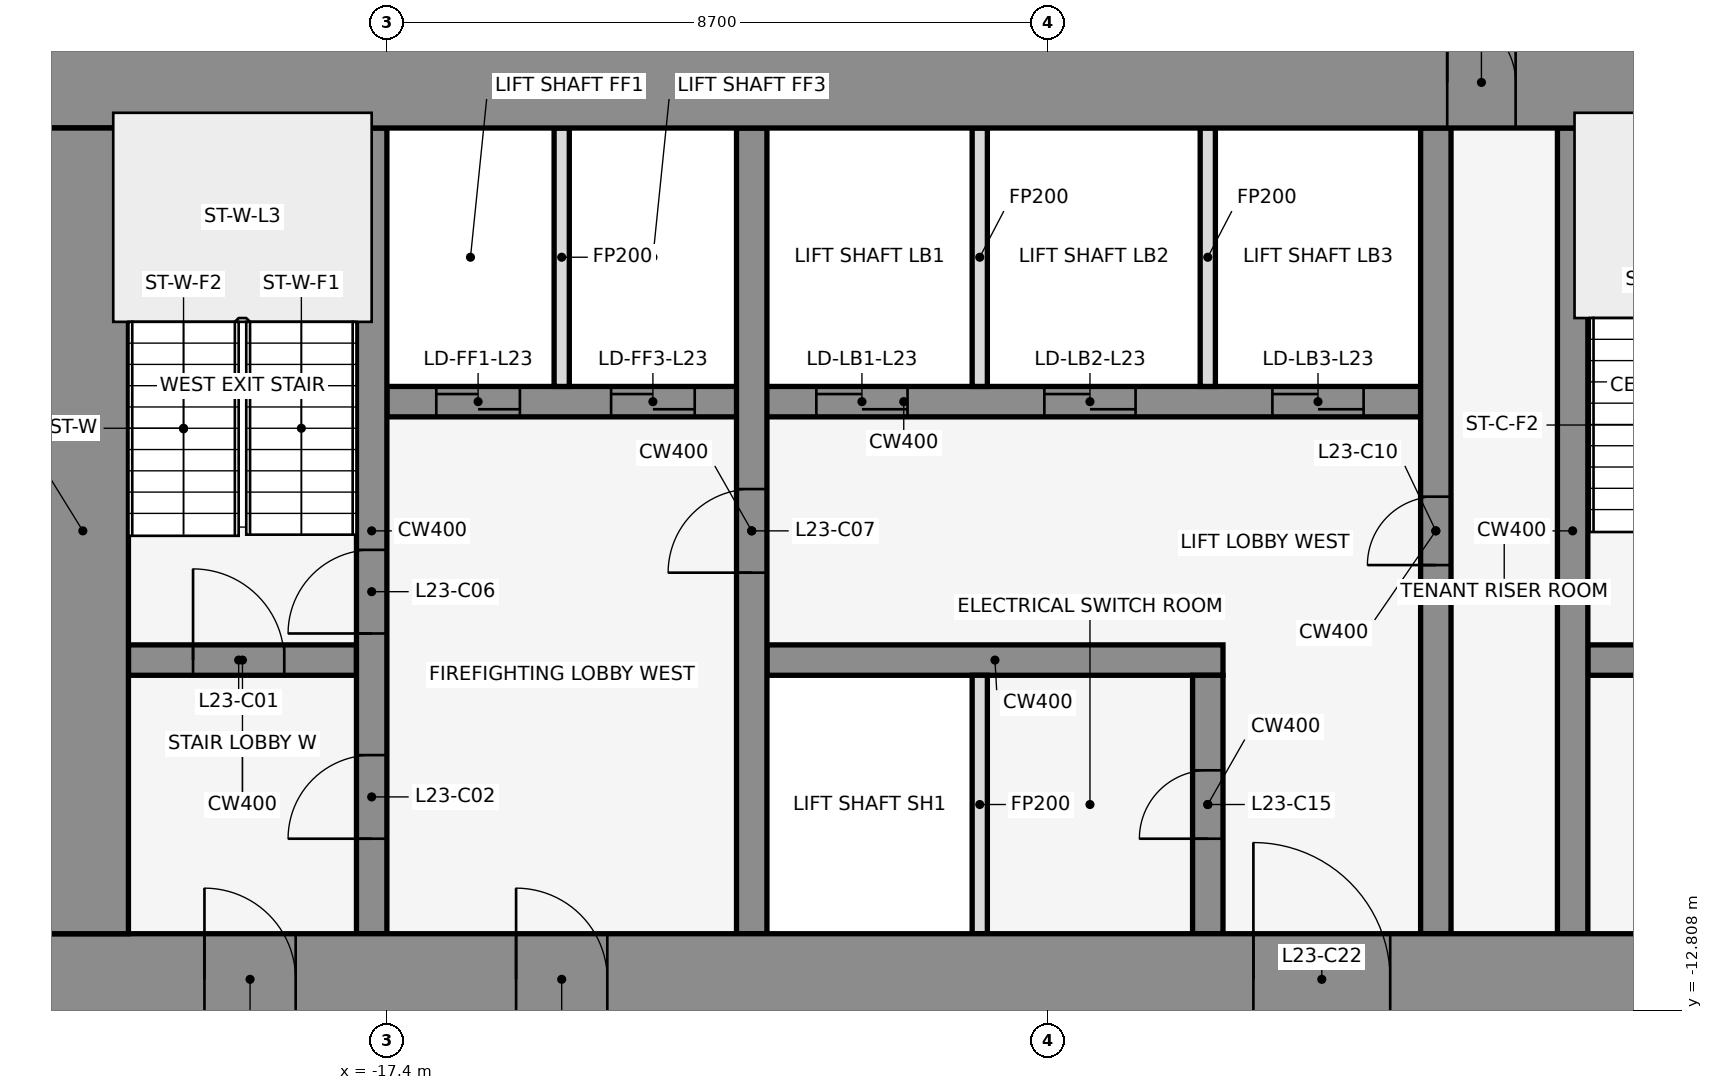
"""IFC4 building model, lengths in metres.
Left out: names, types, materials, properties, quantities, classifications, styles, units other than length and angle.
Written with IfcOpenShell. Run it as: python <this file> out.ifc"""

import sys

from ifc_helpers import new_model, si_unit, direction, frame, frame_2d, origin, place, context, subcontext, project, spatial, rectangle, extrude, element, fill, save


model = new_model("IFC4")
c1 = context("Model", 3, precision=1e-05, world=origin(), true_north=direction((0.0, 1.0)))
c2 = subcontext(c1, "Body", "Model", "MODEL_VIEW")
j1 = project(units=[si_unit("LENGTHUNIT", "METRE"), si_unit("PLANEANGLEUNIT", "RADIAN")], contexts=[c1])
p1 = place(None, origin())
s1 = spatial("IfcSite", under=j1, at=p1, CompositionType="ELEMENT")
p2 = place(p1, origin())
s2 = spatial("IfcBuilding", under=s1, at=p2, CompositionType="ELEMENT")
p3 = place(p2, frame((0.0, 0.0, 110.4)))
s3 = spatial("IfcBuildingStorey", under=s2, at=p3, CompositionType="ELEMENT", Elevation=110.4)
for number, where, z_axis, x_axis in (
    (1, (-0.068, -0.105, 0.0), (0.0, 0.0, 1.0), (-0.84, 0.543, 0.0)),
    (2, (-14.599, 1.08, 0.0), (0.0, 0.0, 1.0), (-0.84, -0.543, 0.0)),
):
    element("IfcWall", number, at=place(p3, frame(where, z_axis=z_axis, x_axis=x_axis)), inside=s3, PredefinedType="STANDARD", context=c2, shape_type="SweptSolid", body=[
        extrude(rectangle(XDim=2.183, YDim=0.25, at=frame_2d((1.091, 0.0))), origin(), (0.0, 0.0, 1.0), 3.95),
    ])
p4 = place(p3, frame((-20.8, -8.2, 0.0), z_axis=(0.0, 0.0, 1.0), x_axis=(1.0, 0.0, 0.0)))
e3 = element("IfcWall", 3, at=p4, inside=s3, PredefinedType="SHEAR", context=c2, shape_type="SweptSolid", body=[
    extrude(rectangle(XDim=3.0, YDim=0.4, at=frame_2d((1.5, 0.0))), origin(), (0.0, 0.0, 1.0), 4.1),
])
p5 = place(p4, frame((0.85, 0.0, 0.0)))
e4 = element("IfcOpeningElement", 4, at=p5, cuts=e3, PredefinedType="OPENING", context=c2, shape_type="SweptSolid", body=[
    extrude(rectangle(XDim=1.2, YDim=2.1, at=frame_2d((0.6, 1.05))), frame((0.0, 0.212, 0.0), z_axis=(0.0, -1.0, 0.0), x_axis=(1.0, 0.0, 0.0)), (0.0, 0.0, 1.0), 0.424),
])
p6 = place(p3, frame((-12.4, -8.2, 0.0), z_axis=(0.0, 0.0, 1.0), x_axis=(1.0, 0.0, 0.0)))
e5 = element("IfcWall", 5, at=p6, inside=s3, PredefinedType="SHEAR", context=c2, shape_type="SweptSolid", body=[
    extrude(rectangle(XDim=6.0, YDim=0.4, at=frame_2d((3.0, 0.0))), origin(), (0.0, 0.0, 1.0), 4.1),
])
p7 = place(p3, frame((-1.6, -8.2, 0.0), z_axis=(0.0, 0.0, 1.0), x_axis=(1.0, 0.0, 0.0)))
e6 = element("IfcWall", 6, at=p7, inside=s3, PredefinedType="SHEAR", context=c2, shape_type="SweptSolid", body=[
    extrude(rectangle(XDim=3.2, YDim=0.4, at=frame_2d((1.6, 0.0))), origin(), (0.0, 0.0, 1.0), 4.1),
])
p8 = place(p7, frame((1.05, 0.0, 0.0)))
e7 = element("IfcOpeningElement", 7, at=p8, cuts=e6, PredefinedType="OPENING", context=c2, shape_type="SweptSolid", body=[
    extrude(rectangle(XDim=1.2, YDim=2.1, at=frame_2d((0.6, 1.05))), frame((0.0, 0.212, 0.0), z_axis=(0.0, -1.0, 0.0), x_axis=(1.0, 0.0, 0.0)), (0.0, 0.0, 1.0), 0.424),
])
p9 = place(p3, frame((-17.4, -4.8, 0.0), z_axis=(0.0, 0.0, 1.0), x_axis=(1.0, 0.0, 0.0)))
e8 = element("IfcWall", 8, at=p9, inside=s3, PredefinedType="SHEAR", context=c2, shape_type="SweptSolid", body=[
    extrude(rectangle(XDim=13.6, YDim=0.4, at=frame_2d((6.8, 0.0))), origin(), (0.0, 0.0, 1.0), 4.1),
])
p10 = place(p9, frame((0.65, 0.0, 0.0)))
e9 = element("IfcOpeningElement", 9, at=p10, cuts=e8, PredefinedType="OPENING", context=c2, shape_type="SweptSolid", body=[
    extrude(rectangle(XDim=1.1, YDim=2.1, at=frame_2d((0.55, 1.05))), frame((0.0, 0.212, 0.0), z_axis=(0.0, -1.0, 0.0), x_axis=(1.0, 0.0, 0.0)), (0.0, 0.0, 1.0), 0.424),
])
p11 = place(p9, frame((2.95, 0.0, 0.0)))
e10 = element("IfcOpeningElement", 10, at=p11, cuts=e8, PredefinedType="OPENING", context=c2, shape_type="SweptSolid", body=[
    extrude(rectangle(XDim=1.1, YDim=2.1, at=frame_2d((0.55, 1.05))), frame((0.0, 0.212, 0.0), z_axis=(0.0, -1.0, 0.0), x_axis=(1.0, 0.0, 0.0)), (0.0, 0.0, 1.0), 0.424),
])
p12 = place(p9, frame((5.65, 0.0, 0.0)))
e11 = element("IfcOpeningElement", 11, at=p12, cuts=e8, PredefinedType="OPENING", context=c2, shape_type="SweptSolid", body=[
    extrude(rectangle(XDim=1.2, YDim=2.1, at=frame_2d((0.6, 1.05))), frame((0.0, 0.212, 0.0), z_axis=(0.0, -1.0, 0.0), x_axis=(1.0, 0.0, 0.0)), (0.0, 0.0, 1.0), 0.424),
])
p13 = place(p9, frame((8.65, 0.0, 0.0)))
e12 = element("IfcOpeningElement", 12, at=p13, cuts=e8, PredefinedType="OPENING", context=c2, shape_type="SweptSolid", body=[
    extrude(rectangle(XDim=1.2, YDim=2.1, at=frame_2d((0.6, 1.05))), frame((0.0, 0.212, 0.0), z_axis=(0.0, -1.0, 0.0), x_axis=(1.0, 0.0, 0.0)), (0.0, 0.0, 1.0), 0.424),
])
p14 = place(p9, frame((11.65, 0.0, 0.0)))
e13 = element("IfcOpeningElement", 13, at=p14, cuts=e8, PredefinedType="OPENING", context=c2, shape_type="SweptSolid", body=[
    extrude(rectangle(XDim=1.2, YDim=2.1, at=frame_2d((0.6, 1.05))), frame((0.0, 0.212, 0.0), z_axis=(0.0, -1.0, 0.0), x_axis=(1.0, 0.0, 0.0)), (0.0, 0.0, 1.0), 0.424),
])
p15 = place(p3, frame((-17.6, -11.8, 0.0), z_axis=(0.0, 0.0, 1.0), x_axis=(0.0, 1.0, 0.0)))
e14 = element("IfcWall", 14, at=p15, inside=s3, PredefinedType="SHEAR", context=c2, shape_type="SweptSolid", body=[
    extrude(rectangle(XDim=10.6, YDim=0.4, at=frame_2d((5.3, 0.0))), origin(), (0.0, 0.0, 1.0), 4.1),
])
p16 = place(p15, frame((1.25, 0.0, 0.0)))
e15 = element("IfcOpeningElement", 15, at=p16, cuts=e14, PredefinedType="OPENING", context=c2, shape_type="SweptSolid", body=[
    extrude(rectangle(XDim=1.1, YDim=2.1, at=frame_2d((0.55, 1.05))), frame((0.0, 0.212, 0.0), z_axis=(0.0, -1.0, 0.0), x_axis=(1.0, 0.0, 0.0)), (0.0, 0.0, 1.0), 0.424),
])
p17 = place(p15, frame((3.95, 0.0, 0.0)))
e16 = element("IfcOpeningElement", 16, at=p17, cuts=e14, PredefinedType="OPENING", context=c2, shape_type="SweptSolid", body=[
    extrude(rectangle(XDim=1.1, YDim=2.1, at=frame_2d((0.55, 1.05))), frame((0.0, 0.212, 0.0), z_axis=(0.0, -1.0, 0.0), x_axis=(1.0, 0.0, 0.0)), (0.0, 0.0, 1.0), 0.424),
])
p18 = place(p3, frame((-15.1, -4.6, 0.0), z_axis=(0.0, 0.0, 1.0), x_axis=(0.0, 1.0, 0.0)))
e17 = element("IfcWall", 17, at=p18, inside=s3, PredefinedType="PARTITIONING", context=c2, shape_type="SweptSolid", body=[
    extrude(rectangle(XDim=3.4, YDim=0.2, at=frame_2d((1.7, 0.0))), origin(), (0.0, 0.0, 1.0), 3.018),
])
p19 = place(p3, frame((-12.6, -11.8, 0.0), z_axis=(0.0, 0.0, 1.0), x_axis=(0.0, 1.0, 0.0)))
e18 = element("IfcWall", 18, at=p19, inside=s3, PredefinedType="SHEAR", context=c2, shape_type="SweptSolid", body=[
    extrude(rectangle(XDim=10.6, YDim=0.4, at=frame_2d((5.3, 0.0))), origin(), (0.0, 0.0, 1.0), 4.1),
])
p20 = place(p19, frame((4.75, 0.0, 0.0)))
e19 = element("IfcOpeningElement", 19, at=p20, cuts=e18, PredefinedType="OPENING", context=c2, shape_type="SweptSolid", body=[
    extrude(rectangle(XDim=1.1, YDim=2.1, at=frame_2d((0.55, 1.05))), frame((0.0, 0.212, 0.0), z_axis=(0.0, -1.0, 0.0), x_axis=(1.0, 0.0, 0.0)), (0.0, 0.0, 1.0), 0.424),
])
for number, where, z_axis, x_axis in (
    (20, (-9.6, -11.8, 0.0), (0.0, 0.0, 1.0), (0.0, 1.0, 0.0)),
    (21, (-9.6, -4.6, 0.0), (0.0, 0.0, 1.0), (0.0, 1.0, 0.0)),
):
    element("IfcWall", number, at=place(p3, frame(where, z_axis=z_axis, x_axis=x_axis)), inside=s3, PredefinedType="PARTITIONING", context=c2, shape_type="SweptSolid", body=[
        extrude(rectangle(XDim=3.4, YDim=0.2, at=frame_2d((1.7, 0.0))), origin(), (0.0, 0.0, 1.0), 3.018),
    ])
p21 = place(p3, frame((-6.6, -11.8, 0.0), z_axis=(0.0, 0.0, 1.0), x_axis=(0.0, 1.0, 0.0)))
e22 = element("IfcWall", 22, at=p21, inside=s3, PredefinedType="SHEAR", context=c2, shape_type="SweptSolid", body=[
    extrude(rectangle(XDim=3.4, YDim=0.4, at=frame_2d((1.7, 0.0))), origin(), (0.0, 0.0, 1.0), 4.1),
])
p22 = place(p21, frame((1.25, 0.0, 0.0)))
e23 = element("IfcOpeningElement", 23, at=p22, cuts=e22, PredefinedType="OPENING", context=c2, shape_type="SweptSolid", body=[
    extrude(rectangle(XDim=0.9, YDim=2.1, at=frame_2d((0.45, 1.05))), frame((0.0, 0.212, 0.0), z_axis=(0.0, -1.0, 0.0), x_axis=(1.0, 0.0, 0.0)), (0.0, 0.0, 1.0), 0.424),
])
p23 = place(p3, frame((-6.6, -4.6, 0.0), z_axis=(0.0, 0.0, 1.0), x_axis=(0.0, 1.0, 0.0)))
e24 = element("IfcWall", 24, at=p23, inside=s3, PredefinedType="PARTITIONING", context=c2, shape_type="SweptSolid", body=[
    extrude(rectangle(XDim=3.4, YDim=0.2, at=frame_2d((1.7, 0.0))), origin(), (0.0, 0.0, 1.0), 3.018),
])
p24 = place(p3, frame((-3.6, -11.8, 0.0), z_axis=(0.0, 0.0, 1.0), x_axis=(0.0, 1.0, 0.0)))
e25 = element("IfcWall", 25, at=p24, inside=s3, PredefinedType="SHEAR", context=c2, shape_type="SweptSolid", body=[
    extrude(rectangle(XDim=10.6, YDim=0.4, at=frame_2d((5.3, 0.0))), origin(), (0.0, 0.0, 1.0), 4.1),
])
p25 = place(p24, frame((4.85, 0.0, 0.0)))
e26 = element("IfcOpeningElement", 26, at=p25, cuts=e25, PredefinedType="OPENING", context=c2, shape_type="SweptSolid", body=[
    extrude(rectangle(XDim=0.9, YDim=2.1, at=frame_2d((0.45, 1.05))), frame((0.0, 0.212, 0.0), z_axis=(0.0, -1.0, 0.0), x_axis=(1.0, 0.0, 0.0)), (0.0, 0.0, 1.0), 0.424),
])
p26 = place(p3, frame((-1.8, -11.8, 0.0), z_axis=(0.0, 0.0, 1.0), x_axis=(0.0, 1.0, 0.0)))
e27 = element("IfcWall", 27, at=p26, inside=s3, PredefinedType="SHEAR", context=c2, shape_type="SweptSolid", body=[
    extrude(rectangle(XDim=10.6, YDim=0.4, at=frame_2d((5.3, 0.0))), origin(), (0.0, 0.0, 1.0), 4.1),
])
p27 = place(p3, frame((-22.0, -0.6, 0.0), z_axis=(0.0, 0.0, 1.0), x_axis=(1.0, 0.0, 0.0)))
e28 = element("IfcWall", 28, at=p27, inside=s3, PredefinedType="SHEAR", context=c2, shape_type="SweptSolid", body=[
    extrude(rectangle(XDim=44.0, YDim=1.2, at=frame_2d((22.0, 0.0))), origin(), (0.0, 0.0, 1.0), 4.1),
])
p28 = place(p27, frame((18.55, 0.0, 0.0)))
e29 = element("IfcOpeningElement", 29, at=p28, cuts=e28, PredefinedType="OPENING", context=c2, shape_type="SweptSolid", body=[
    extrude(rectangle(XDim=0.9, YDim=2.1, at=frame_2d((0.45, 1.05))), frame((0.0, 0.612, 0.0), z_axis=(0.0, -1.0, 0.0), x_axis=(1.0, 0.0, 0.0)), (0.0, 0.0, 1.0), 1.224),
])
p29 = place(p27, frame((24.55, 0.0, 0.0)))
e30 = element("IfcOpeningElement", 30, at=p29, cuts=e28, PredefinedType="OPENING", context=c2, shape_type="SweptSolid", body=[
    extrude(rectangle(XDim=0.9, YDim=2.1, at=frame_2d((0.45, 1.05))), frame((0.0, 0.612, 0.0), z_axis=(0.0, -1.0, 0.0), x_axis=(1.0, 0.0, 0.0)), (0.0, 0.0, 1.0), 1.224),
])
p30 = place(p3, frame((-22.0, -12.4, 0.0), z_axis=(0.0, 0.0, 1.0), x_axis=(1.0, 0.0, 0.0)))
e31 = element("IfcWall", 31, at=p30, inside=s3, PredefinedType="SHEAR", context=c2, shape_type="SweptSolid", body=[
    extrude(rectangle(XDim=44.0, YDim=1.2, at=frame_2d((22.0, 0.0))), origin(), (0.0, 0.0, 1.0), 4.1),
])
p31 = place(p30, frame((2.2, 0.0, 0.0)))
e32 = element("IfcOpeningElement", 32, at=p31, cuts=e31, PredefinedType="OPENING", context=c2, shape_type="SweptSolid", body=[
    extrude(rectangle(XDim=1.2, YDim=2.1, at=frame_2d((0.6, 1.05))), frame((0.0, 0.612, 0.0), z_axis=(0.0, -1.0, 0.0), x_axis=(1.0, 0.0, 0.0)), (0.0, 0.0, 1.0), 1.224),
])
p32 = place(p30, frame((21.4, 0.0, 0.0)))
e33 = element("IfcOpeningElement", 33, at=p32, cuts=e31, PredefinedType="OPENING", context=c2, shape_type="SweptSolid", body=[
    extrude(rectangle(XDim=1.2, YDim=2.1, at=frame_2d((0.6, 1.05))), frame((0.0, 0.612, 0.0), z_axis=(0.0, -1.0, 0.0), x_axis=(1.0, 0.0, 0.0)), (0.0, 0.0, 1.0), 1.224),
])
p33 = place(p30, frame((40.6, 0.0, 0.0)))
e34 = element("IfcOpeningElement", 34, at=p33, cuts=e31, PredefinedType="OPENING", context=c2, shape_type="SweptSolid", body=[
    extrude(rectangle(XDim=1.2, YDim=2.1, at=frame_2d((0.6, 1.05))), frame((0.0, 0.612, 0.0), z_axis=(0.0, -1.0, 0.0), x_axis=(1.0, 0.0, 0.0)), (0.0, 0.0, 1.0), 1.224),
])
p34 = place(p30, frame((16.0, 0.0, 0.0)))
e35 = element("IfcOpeningElement", 35, at=p34, cuts=e31, PredefinedType="OPENING", context=c2, shape_type="SweptSolid", body=[
    extrude(rectangle(XDim=1.8, YDim=2.1, at=frame_2d((0.9, 1.05))), frame((0.0, 0.612, 0.0), z_axis=(0.0, -1.0, 0.0), x_axis=(1.0, 0.0, 0.0)), (0.0, 0.0, 1.0), 1.224),
])
p35 = place(p30, frame((6.3, 0.0, 0.0)))
e36 = element("IfcOpeningElement", 36, at=p35, cuts=e31, PredefinedType="OPENING", context=c2, shape_type="SweptSolid", body=[
    extrude(rectangle(XDim=1.2, YDim=2.1, at=frame_2d((0.6, 1.05))), frame((0.0, 0.612, 0.0), z_axis=(0.0, -1.0, 0.0), x_axis=(1.0, 0.0, 0.0)), (0.0, 0.0, 1.0), 1.224),
])
p36 = place(p30, frame((26.2, 0.0, 0.0)))
e37 = element("IfcOpeningElement", 37, at=p36, cuts=e31, PredefinedType="OPENING", context=c2, shape_type="SweptSolid", body=[
    extrude(rectangle(XDim=1.8, YDim=2.1, at=frame_2d((0.9, 1.05))), frame((0.0, 0.612, 0.0), z_axis=(0.0, -1.0, 0.0), x_axis=(1.0, 0.0, 0.0)), (0.0, 0.0, 1.0), 1.224),
])
p37 = place(p30, frame((36.5, 0.0, 0.0)))
e38 = element("IfcOpeningElement", 38, at=p37, cuts=e31, PredefinedType="OPENING", context=c2, shape_type="SweptSolid", body=[
    extrude(rectangle(XDim=1.2, YDim=2.1, at=frame_2d((0.6, 1.05))), frame((0.0, 0.612, 0.0), z_axis=(0.0, -1.0, 0.0), x_axis=(1.0, 0.0, 0.0)), (0.0, 0.0, 1.0), 1.224),
])
p38 = place(p3, frame((-21.4, -11.8, 0.0), z_axis=(0.0, 0.0, 1.0), x_axis=(0.0, 1.0, 0.0)))
e39 = element("IfcWall", 39, at=p38, inside=s3, PredefinedType="SHEAR", context=c2, shape_type="SweptSolid", body=[
    extrude(rectangle(XDim=10.6, YDim=1.2, at=frame_2d((5.3, 0.0))), origin(), (0.0, 0.0, 1.0), 4.1),
])
p39 = place(p5, origin())
e40 = element("IfcDoor", 40, at=p39, inside=s3, OperationType="SINGLE_SWING_LEFT", PredefinedType="DOOR", context=c2, shape_type="SweptSolid", body=[
    extrude(rectangle(XDim=1.2, YDim=2.1, at=frame_2d((0.6, 1.05))), frame((0.0, 0.025, 0.0), z_axis=(0.0, -1.0, 0.0), x_axis=(1.0, 0.0, 0.0)), (0.0, 0.0, 1.0), 0.05),
])
fill(e4, e40)
p40 = place(p16, frame((1.1, 0.0, 0.0), z_axis=(0.0, 0.0, 1.0), x_axis=(-1.0, 0.0, 0.0)))
e41 = element("IfcDoor", 41, at=p40, inside=s3, OperationType="SINGLE_SWING_LEFT", PredefinedType="DOOR", context=c2, shape_type="SweptSolid", body=[
    extrude(rectangle(XDim=1.1, YDim=2.1, at=frame_2d((0.55, 1.05))), frame((0.0, 0.025, 0.0), z_axis=(0.0, -1.0, 0.0), x_axis=(1.0, 0.0, 0.0)), (0.0, 0.0, 1.0), 0.05),
])
fill(e15, e41)
p41 = place(p10, origin())
e42 = element("IfcDoor", 42, at=p41, inside=s3, OperationType="DOUBLE_DOOR_SLIDING", PredefinedType="DOOR", context=c2, shape_type="SweptSolid", body=[
    extrude(rectangle(XDim=1.1, YDim=2.1, at=frame_2d((0.55, 1.05))), frame((0.0, 0.025, 0.0), z_axis=(0.0, -1.0, 0.0), x_axis=(1.0, 0.0, 0.0)), (0.0, 0.0, 1.0), 0.05),
])
fill(e9, e42)
p42 = place(p11, origin())
e43 = element("IfcDoor", 43, at=p42, inside=s3, OperationType="DOUBLE_DOOR_SLIDING", PredefinedType="DOOR", context=c2, shape_type="SweptSolid", body=[
    extrude(rectangle(XDim=1.1, YDim=2.1, at=frame_2d((0.55, 1.05))), frame((0.0, 0.025, 0.0), z_axis=(0.0, -1.0, 0.0), x_axis=(1.0, 0.0, 0.0)), (0.0, 0.0, 1.0), 0.05),
])
fill(e10, e43)
p43 = place(p12, origin())
e44 = element("IfcDoor", 44, at=p43, inside=s3, OperationType="DOUBLE_DOOR_SLIDING", PredefinedType="DOOR", context=c2, shape_type="SweptSolid", body=[
    extrude(rectangle(XDim=1.2, YDim=2.1, at=frame_2d((0.6, 1.05))), frame((0.0, 0.025, 0.0), z_axis=(0.0, -1.0, 0.0), x_axis=(1.0, 0.0, 0.0)), (0.0, 0.0, 1.0), 0.05),
])
fill(e11, e44)
p44 = place(p13, origin())
e45 = element("IfcDoor", 45, at=p44, inside=s3, OperationType="DOUBLE_DOOR_SLIDING", PredefinedType="DOOR", context=c2, shape_type="SweptSolid", body=[
    extrude(rectangle(XDim=1.2, YDim=2.1, at=frame_2d((0.6, 1.05))), frame((0.0, 0.025, 0.0), z_axis=(0.0, -1.0, 0.0), x_axis=(1.0, 0.0, 0.0)), (0.0, 0.0, 1.0), 0.05),
])
fill(e12, e45)
p45 = place(p14, origin())
e46 = element("IfcDoor", 46, at=p45, inside=s3, OperationType="DOUBLE_DOOR_SLIDING", PredefinedType="DOOR", context=c2, shape_type="SweptSolid", body=[
    extrude(rectangle(XDim=1.2, YDim=2.1, at=frame_2d((0.6, 1.05))), frame((0.0, 0.025, 0.0), z_axis=(0.0, -1.0, 0.0), x_axis=(1.0, 0.0, 0.0)), (0.0, 0.0, 1.0), 0.05),
])
fill(e13, e46)
p46 = place(p17, frame((1.1, 0.0, 0.0), z_axis=(0.0, 0.0, 1.0), x_axis=(-1.0, 0.0, 0.0)))
e47 = element("IfcDoor", 47, at=p46, inside=s3, OperationType="SINGLE_SWING_LEFT", PredefinedType="DOOR", context=c2, shape_type="SweptSolid", body=[
    extrude(rectangle(XDim=1.1, YDim=2.1, at=frame_2d((0.55, 1.05))), frame((0.0, 0.025, 0.0), z_axis=(0.0, -1.0, 0.0), x_axis=(1.0, 0.0, 0.0)), (0.0, 0.0, 1.0), 0.05),
])
fill(e16, e47)
p47 = place(p20, origin())
e48 = element("IfcDoor", 48, at=p47, inside=s3, OperationType="SINGLE_SWING_LEFT", PredefinedType="DOOR", context=c2, shape_type="SweptSolid", body=[
    extrude(rectangle(XDim=1.1, YDim=2.1, at=frame_2d((0.55, 1.05))), frame((0.0, 0.025, 0.0), z_axis=(0.0, -1.0, 0.0), x_axis=(1.0, 0.0, 0.0)), (0.0, 0.0, 1.0), 0.05),
])
fill(e19, e48)
p48 = place(p25, frame((0.9, 0.0, 0.0), z_axis=(0.0, 0.0, 1.0), x_axis=(-1.0, 0.0, 0.0)))
e49 = element("IfcDoor", 49, at=p48, inside=s3, OperationType="SINGLE_SWING_LEFT", PredefinedType="DOOR", context=c2, shape_type="SweptSolid", body=[
    extrude(rectangle(XDim=0.9, YDim=2.1, at=frame_2d((0.45, 1.05))), frame((0.0, 0.025, 0.0), z_axis=(0.0, -1.0, 0.0), x_axis=(1.0, 0.0, 0.0)), (0.0, 0.0, 1.0), 0.05),
])
fill(e26, e49)
p49 = place(p22, origin())
e50 = element("IfcDoor", 50, at=p49, inside=s3, OperationType="SINGLE_SWING_LEFT", PredefinedType="DOOR", context=c2, shape_type="SweptSolid", body=[
    extrude(rectangle(XDim=0.9, YDim=2.1, at=frame_2d((0.45, 1.05))), frame((0.0, 0.025, 0.0), z_axis=(0.0, -1.0, 0.0), x_axis=(1.0, 0.0, 0.0)), (0.0, 0.0, 1.0), 0.05),
])
fill(e23, e50)
p50 = place(p28, origin())
e51 = element("IfcDoor", 51, at=p50, inside=s3, OperationType="SINGLE_SWING_LEFT", PredefinedType="DOOR", context=c2, shape_type="SweptSolid", body=[
    extrude(rectangle(XDim=0.9, YDim=2.1, at=frame_2d((0.45, 1.05))), frame((0.0, 0.025, 0.0), z_axis=(0.0, -1.0, 0.0), x_axis=(1.0, 0.0, 0.0)), (0.0, 0.0, 1.0), 0.05),
])
fill(e29, e51)
p51 = place(p31, frame((1.2, 0.0, 0.0), z_axis=(0.0, 0.0, 1.0), x_axis=(-1.0, 0.0, 0.0)))
e52 = element("IfcDoor", 52, at=p51, inside=s3, OperationType="SINGLE_SWING_RIGHT", PredefinedType="DOOR", context=c2, shape_type="SweptSolid", body=[
    extrude(rectangle(XDim=1.2, YDim=2.1, at=frame_2d((0.6, 1.05))), frame((0.0, 0.025, 0.0), z_axis=(0.0, -1.0, 0.0), x_axis=(1.0, 0.0, 0.0)), (0.0, 0.0, 1.0), 0.05),
])
fill(e32, e52)
p52 = place(p34, origin())
e53 = element("IfcDoor", 53, at=p52, inside=s3, OperationType="SINGLE_SWING_LEFT", PredefinedType="DOOR", context=c2, shape_type="SweptSolid", body=[
    extrude(rectangle(XDim=1.8, YDim=2.1, at=frame_2d((0.9, 1.05))), frame((0.0, 0.025, 0.0), z_axis=(0.0, -1.0, 0.0), x_axis=(1.0, 0.0, 0.0)), (0.0, 0.0, 1.0), 0.05),
])
fill(e35, e53)
p53 = place(p35, frame((1.2, 0.0, 0.0), z_axis=(0.0, 0.0, 1.0), x_axis=(-1.0, 0.0, 0.0)))
e54 = element("IfcDoor", 54, at=p53, inside=s3, OperationType="SINGLE_SWING_RIGHT", PredefinedType="DOOR", context=c2, shape_type="SweptSolid", body=[
    extrude(rectangle(XDim=1.2, YDim=2.1, at=frame_2d((0.6, 1.05))), frame((0.0, 0.025, 0.0), z_axis=(0.0, -1.0, 0.0), x_axis=(1.0, 0.0, 0.0)), (0.0, 0.0, 1.0), 0.05),
])
fill(e36, e54)
save(model, sys.argv[1])
